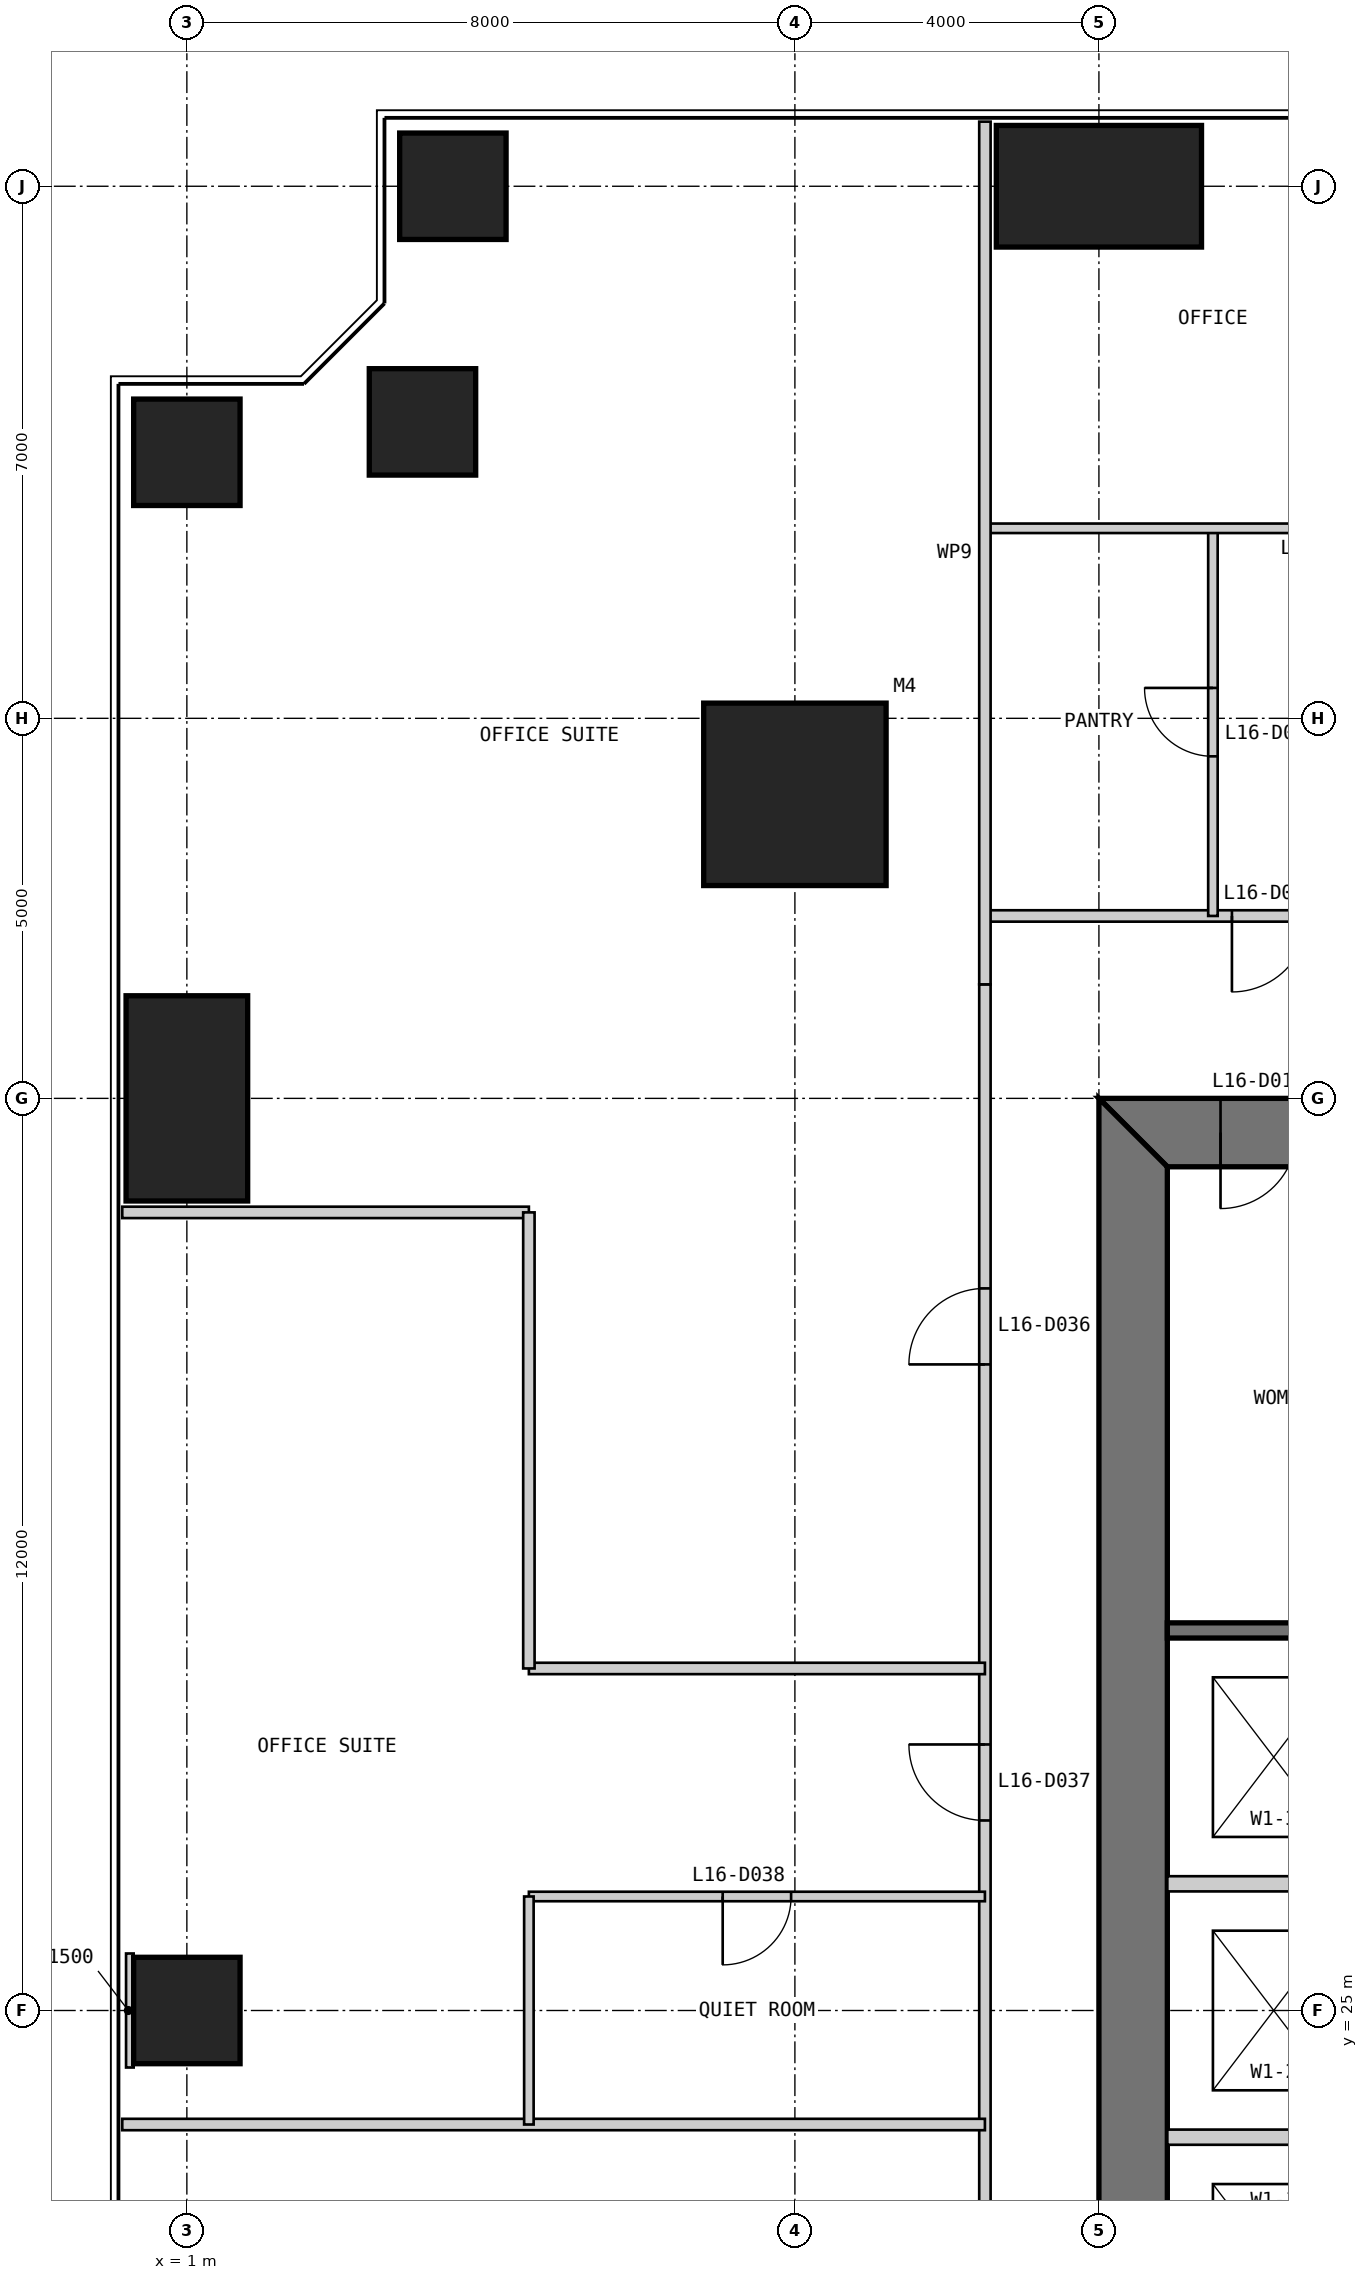
"""IFC4 building model, lengths in metres.
Left out: names, types, materials, properties, quantities, classifications, styles, units other than length and angle.
Written with IfcOpenShell. Run it as: python <this file> out.ifc"""

import sys

from ifc_helpers import new_model, si_unit, direction, frame, frame_2d, origin, origin_2d, place, context, subcontext, project, spatial, polyline, rectangle, outline, extrude, element, fill, save


model = new_model("IFC4")
c1 = context("Model", 3, precision=1e-05, world=origin(), true_north=direction((0.0, 1.0)))
c2 = subcontext(c1, "Body", "Model", "MODEL_VIEW")
j1 = project(units=[si_unit("LENGTHUNIT", "METRE"), si_unit("PLANEANGLEUNIT", "RADIAN")], contexts=[c1])
p1 = place(None, origin())
s1 = spatial("IfcSite", under=j1, at=p1, CompositionType="ELEMENT")
p2 = place(p1, origin())
s2 = spatial("IfcBuilding", under=s1, at=p2, CompositionType="ELEMENT")
p3 = place(p2, frame((0.0, 0.0, 71.0)))
s3 = spatial("IfcBuildingStorey", under=s2, at=p3, CompositionType="ELEMENT", Elevation=71.0)
p4 = place(p3, frame((9.0, 41.0, 0.0), z_axis=(0.0, 0.0, 1.0), x_axis=(1.0, 0.0, 0.0)))
e1 = element("IfcColumn", 1, at=p4, inside=s3, PredefinedType="COLUMN", context=c2, shape_type="SweptSolid", body=[
    extrude(rectangle(XDim=2.4, YDim=2.4, at=origin_2d()), origin(), (0.0, 0.0, 1.0), 4.0),
])
p5 = place(p3, frame((13.0, 49.0, 0.0), z_axis=(0.0, 0.0, 1.0), x_axis=(1.0, 0.0, 0.0)))
e2 = element("IfcColumn", 2, at=p5, inside=s3, PredefinedType="COLUMN", context=c2, shape_type="SweptSolid", body=[
    extrude(rectangle(XDim=2.7, YDim=1.6, at=origin_2d()), origin(), (0.0, 0.0, 1.0), 4.0),
])
for number, where, z_axis, x_axis in (
    (3, (4.5, 49.0, 0.0), (0.0, 0.0, 1.0), (1.0, 0.0, 0.0)),
    (4, (4.1, 45.9, 0.0), (0.0, 0.0, 1.0), (1.0, 0.0, 0.0)),
    (5, (1.0, 45.5, 0.0), (0.0, 0.0, 1.0), (1.0, 0.0, 0.0)),
):
    element("IfcColumn", number, at=place(p3, frame(where, z_axis=z_axis, x_axis=x_axis)), inside=s3, PredefinedType="COLUMN", context=c2, shape_type="SweptSolid", body=[
        extrude(rectangle(XDim=1.4, YDim=1.4, at=origin_2d()), origin(), (0.0, 0.0, 1.0), 4.0),
    ])
p6 = place(p3, frame((1.0, 37.0, 0.0), z_axis=(0.0, 0.0, 1.0), x_axis=(1.0, 0.0, 0.0)))
e6 = element("IfcColumn", 6, at=p6, inside=s3, PredefinedType="COLUMN", context=c2, shape_type="SweptSolid", body=[
    extrude(rectangle(XDim=1.6, YDim=2.7, at=origin_2d()), origin(), (0.0, 0.0, 1.0), 4.0),
])
p7 = place(p3, frame((1.0, 25.0, 0.0), z_axis=(0.0, 0.0, 1.0), x_axis=(1.0, 0.0, 0.0)))
e7 = element("IfcColumn", 7, at=p7, inside=s3, PredefinedType="COLUMN", context=c2, shape_type="SweptSolid", body=[
    extrude(rectangle(XDim=1.4, YDim=1.4, at=origin_2d()), origin(), (0.0, 0.0, 1.0), 4.0),
])
p8 = place(p3, frame((37.0, 36.55, 0.0), z_axis=(0.0, 0.0, 1.0), x_axis=(-1.0, 0.0, 0.0)))
e8 = element("IfcWall", 8, at=p8, inside=s3, PredefinedType="SHEAR", context=c2, shape_type="SweptSolid", body=[
    extrude(outline(polyline([(0.0, -0.45), (24.0, -0.45), (23.1, 0.45), (0.9, 0.45), (0.0, -0.45)])), origin(), (0.0, 0.0, 1.0), 4.0),
])
p9 = place(p8, frame((4.9, 0.0, 0.0)))
e9 = element("IfcOpeningElement", 9, at=p9, cuts=e8, PredefinedType="OPENING", context=c2, shape_type="SweptSolid", body=[
    extrude(rectangle(XDim=1.0, YDim=2.2, at=frame_2d((0.5, 1.1))), frame((0.0, 0.46, 0.0), z_axis=(0.0, -1.0, 0.0), x_axis=(1.0, 0.0, 0.0)), (0.0, 0.0, 1.0), 0.92),
])
p10 = place(p8, frame((8.9, 0.0, 0.0)))
e10 = element("IfcOpeningElement", 10, at=p10, cuts=e8, PredefinedType="OPENING", context=c2, shape_type="SweptSolid", body=[
    extrude(rectangle(XDim=1.1, YDim=2.2, at=frame_2d((0.55, 1.1))), frame((0.0, 0.46, 0.0), z_axis=(0.0, -1.0, 0.0), x_axis=(1.0, 0.0, 0.0)), (0.0, 0.0, 1.0), 0.92),
])
p11 = place(p8, frame((15.05, 0.0, 0.0)))
e11 = element("IfcOpeningElement", 11, at=p11, cuts=e8, PredefinedType="OPENING", context=c2, shape_type="SweptSolid", body=[
    extrude(rectangle(XDim=0.9, YDim=2.2, at=frame_2d((0.45, 1.1))), frame((0.0, 0.46, 0.0), z_axis=(0.0, -1.0, 0.0), x_axis=(1.0, 0.0, 0.0)), (0.0, 0.0, 1.0), 0.92),
])
p12 = place(p8, frame((17.9, 0.0, 0.0)))
e12 = element("IfcOpeningElement", 12, at=p12, cuts=e8, PredefinedType="OPENING", context=c2, shape_type="SweptSolid", body=[
    extrude(rectangle(XDim=1.0, YDim=2.2, at=frame_2d((0.5, 1.1))), frame((0.0, 0.46, 0.0), z_axis=(0.0, -1.0, 0.0), x_axis=(1.0, 0.0, 0.0)), (0.0, 0.0, 1.0), 0.92),
])
p13 = place(p8, frame((21.4, 0.0, 0.0)))
e13 = element("IfcOpeningElement", 13, at=p13, cuts=e8, PredefinedType="OPENING", context=c2, shape_type="SweptSolid", body=[
    extrude(rectangle(XDim=1.0, YDim=2.2, at=frame_2d((0.5, 1.1))), frame((0.0, 0.46, 0.0), z_axis=(0.0, -1.0, 0.0), x_axis=(1.0, 0.0, 0.0)), (0.0, 0.0, 1.0), 0.92),
])
p14 = place(p3, frame((13.45, 36.1, 0.0), z_axis=(0.0, 0.0, 1.0), x_axis=(0.0, -1.0, 0.0)))
e14 = element("IfcWall", 14, at=p14, inside=s3, PredefinedType="SHEAR", context=c2, shape_type="SweptSolid", body=[
    extrude(outline(polyline([(-0.9, -0.45), (23.1, -0.45), (22.2, 0.45), (0.0, 0.45), (-0.9, -0.45)])), origin(), (0.0, 0.0, 1.0), 4.0),
])
p15 = place(p14, frame((20.2, 0.0, 0.0)))
e15 = element("IfcOpeningElement", 15, at=p15, cuts=e14, PredefinedType="OPENING", context=c2, shape_type="SweptSolid", body=[
    extrude(rectangle(XDim=1.0, YDim=2.2, at=frame_2d((0.5, 1.1))), frame((0.0, 0.46, 0.0), z_axis=(0.0, -1.0, 0.0), x_axis=(1.0, 0.0, 0.0)), (0.0, 0.0, 1.0), 0.92),
])
p16 = place(p14, frame((17.25, 0.0, 0.0)))
e16 = element("IfcOpeningElement", 16, at=p16, cuts=e14, PredefinedType="OPENING", context=c2, shape_type="SweptSolid", body=[
    extrude(rectangle(XDim=0.9, YDim=2.2, at=frame_2d((0.45, 1.1))), frame((0.0, 0.46, 0.0), z_axis=(0.0, -1.0, 0.0), x_axis=(1.0, 0.0, 0.0)), (0.0, 0.0, 1.0), 0.92),
])
for number, where, z_axis, x_axis in (
    (17, (13.9, 23.333, 0.0), (0.0, 0.0, 1.0), (1.0, 0.0, 0.0)),
    (18, (13.9, 26.667, 0.0), (0.0, 0.0, 1.0), (1.0, 0.0, 0.0)),
):
    element("IfcWall", number, at=place(p3, frame(where, z_axis=z_axis, x_axis=x_axis)), inside=s3, PredefinedType="PARTITIONING", context=c2, shape_type="SweptSolid", body=[
        extrude(rectangle(XDim=2.8, YDim=0.2, at=frame_2d((1.4, 0.0))), origin(), (0.0, 0.0, 1.0), 3.8),
    ])
p17 = place(p3, frame((29.7, 30.0, 0.0), z_axis=(0.0, 0.0, 1.0), x_axis=(-1.0, 0.0, 0.0)))
e19 = element("IfcWall", 19, at=p17, inside=s3, PredefinedType="SOLIDWALL", context=c2, shape_type="SweptSolid", body=[
    extrude(rectangle(XDim=15.8, YDim=0.2, at=frame_2d((7.9, 0.0))), origin(), (0.0, 0.0, 1.0), 3.8),
])
p18 = place(p3, frame((39.4, 39.4, 0.0), z_axis=(0.0, 0.0, 1.0), x_axis=(-1.0, 0.0, 0.0)))
e20 = element("IfcWall", 20, at=p18, inside=s3, PredefinedType="PARTITIONING", context=c2, shape_type="SweptSolid", body=[
    extrude(rectangle(XDim=27.9, YDim=0.15, at=frame_2d((13.95, 0.0))), origin(), (0.0, 0.0, 1.0), 3.85),
])
p19 = place(p18, frame((1.15, 0.0, 0.0)))
e21 = element("IfcOpeningElement", 21, at=p19, cuts=e20, PredefinedType="OPENING", context=c2, shape_type="SweptSolid", body=[
    extrude(rectangle(XDim=1.0, YDim=2.2, at=frame_2d((0.5, 1.1))), frame((0.0, 0.085, 0.0), z_axis=(0.0, -1.0, 0.0), x_axis=(1.0, 0.0, 0.0)), (0.0, 0.0, 1.0), 0.17),
])
p20 = place(p18, frame((23.65, 0.0, 0.0)))
e22 = element("IfcOpeningElement", 22, at=p20, cuts=e20, PredefinedType="OPENING", context=c2, shape_type="SweptSolid", body=[
    extrude(rectangle(XDim=1.0, YDim=2.2, at=frame_2d((0.5, 1.1))), frame((0.0, 0.085, 0.0), z_axis=(0.0, -1.0, 0.0), x_axis=(1.0, 0.0, 0.0)), (0.0, 0.0, 1.0), 0.17),
])
p21 = place(p3, frame((14.5, 44.5, 0.0), z_axis=(0.0, 0.0, 1.0), x_axis=(0.0, -1.0, 0.0)))
e23 = element("IfcWall", 23, at=p21, inside=s3, PredefinedType="PARTITIONING", context=c2, shape_type="SweptSolid", body=[
    extrude(rectangle(XDim=5.1, YDim=0.125, at=frame_2d((2.55, 0.0))), origin(), (0.0, 0.0, 1.0), 3.85),
])
p22 = place(p21, frame((2.1, 0.0, 0.0)))
e24 = element("IfcOpeningElement", 24, at=p22, cuts=e23, PredefinedType="OPENING", context=c2, shape_type="SweptSolid", body=[
    extrude(rectangle(XDim=0.9, YDim=2.2, at=frame_2d((0.45, 1.1))), frame((0.0, 0.073, 0.0), z_axis=(0.0, -1.0, 0.0), x_axis=(1.0, 0.0, 0.0)), (0.0, 0.0, 1.0), 0.145),
])
p23 = place(p3, frame((29.5, 44.5, 0.0), z_axis=(0.0, 0.0, 1.0), x_axis=(-1.0, 0.0, 0.0)))
e25 = element("IfcWall", 25, at=p23, inside=s3, PredefinedType="PARTITIONING", context=c2, shape_type="SweptSolid", body=[
    extrude(rectangle(XDim=18.0, YDim=0.125, at=frame_2d((9.0, 0.0))), origin(), (0.0, 0.0, 1.0), 3.85),
])
p24 = place(p23, frame((10.0, 0.0, 0.0)))
e26 = element("IfcOpeningElement", 26, at=p24, cuts=e25, PredefinedType="OPENING", context=c2, shape_type="SweptSolid", body=[
    extrude(rectangle(XDim=1.0, YDim=2.2, at=frame_2d((0.5, 1.1))), frame((0.0, 0.073, 0.0), z_axis=(0.0, -1.0, 0.0), x_axis=(1.0, 0.0, 0.0)), (0.0, 0.0, 1.0), 0.145),
])
p25 = place(p23, frame((13.05, 0.0, 0.0)))
e27 = element("IfcOpeningElement", 27, at=p25, cuts=e25, PredefinedType="OPENING", context=c2, shape_type="SweptSolid", body=[
    extrude(rectangle(XDim=0.9, YDim=2.2, at=frame_2d((0.45, 1.1))), frame((0.0, 0.073, 0.0), z_axis=(0.0, -1.0, 0.0), x_axis=(1.0, 0.0, 0.0)), (0.0, 0.0, 1.0), 0.145),
])
p26 = place(p3, frame((11.5, 38.5, 0.0), z_axis=(0.0, 0.0, 1.0), x_axis=(0.0, -1.0, 0.0)))
e28 = element("IfcWall", 28, at=p26, inside=s3, PredefinedType="PARTITIONING", context=c2, shape_type="SweptSolid", body=[
    extrude(rectangle(XDim=27.0, YDim=0.15, at=frame_2d((13.5, 0.0))), origin(), (0.0, 0.0, 1.0), 3.85),
])
p27 = place(p26, frame((4.0, 0.0, 0.0)))
e29 = element("IfcOpeningElement", 29, at=p27, cuts=e28, PredefinedType="OPENING", context=c2, shape_type="SweptSolid", body=[
    extrude(rectangle(XDim=1.0, YDim=2.2, at=frame_2d((0.5, 1.1))), frame((0.0, 0.085, 0.0), z_axis=(0.0, -1.0, 0.0), x_axis=(1.0, 0.0, 0.0)), (0.0, 0.0, 1.0), 0.17),
])
p28 = place(p26, frame((10.0, 0.0, 0.0)))
e30 = element("IfcOpeningElement", 30, at=p28, cuts=e28, PredefinedType="OPENING", context=c2, shape_type="SweptSolid", body=[
    extrude(rectangle(XDim=1.0, YDim=2.2, at=frame_2d((0.5, 1.1))), frame((0.0, 0.085, 0.0), z_axis=(0.0, -1.0, 0.0), x_axis=(1.0, 0.0, 0.0)), (0.0, 0.0, 1.0), 0.17),
])
p29 = place(p26, frame((17.5, 0.0, 0.0)))
e31 = element("IfcOpeningElement", 31, at=p29, cuts=e28, PredefinedType="OPENING", context=c2, shape_type="SweptSolid", body=[
    extrude(rectangle(XDim=1.0, YDim=2.2, at=frame_2d((0.5, 1.1))), frame((0.0, 0.085, 0.0), z_axis=(0.0, -1.0, 0.0), x_axis=(1.0, 0.0, 0.0)), (0.0, 0.0, 1.0), 0.17),
])
p30 = place(p26, frame((23.5, 0.0, 0.0)))
e32 = element("IfcOpeningElement", 32, at=p30, cuts=e28, PredefinedType="OPENING", context=c2, shape_type="SweptSolid", body=[
    extrude(rectangle(XDim=1.0, YDim=2.2, at=frame_2d((0.5, 1.1))), frame((0.0, 0.085, 0.0), z_axis=(0.0, -1.0, 0.0), x_axis=(1.0, 0.0, 0.0)), (0.0, 0.0, 1.0), 0.17),
])
p31 = place(p3, frame((11.5, 49.85, 0.0), z_axis=(0.0, 0.0, 1.0), x_axis=(0.0, -1.0, 0.0)))
e33 = element("IfcWall", 33, at=p31, inside=s3, PredefinedType="PARTITIONING", context=c2, shape_type="SweptSolid", body=[
    extrude(rectangle(XDim=11.35, YDim=0.15, at=frame_2d((5.675, 0.0))), origin(), (0.0, 0.0, 1.0), 3.85),
])
p32 = place(p3, frame((0.15, 35.5, 0.0), z_axis=(0.0, 0.0, 1.0), x_axis=(1.0, 0.0, 0.0)))
e34 = element("IfcWall", 34, at=p32, inside=s3, PredefinedType="PARTITIONING", context=c2, shape_type="SweptSolid", body=[
    extrude(rectangle(XDim=5.35, YDim=0.15, at=frame_2d((2.675, 0.0))), origin(), (0.0, 0.0, 1.0), 3.85),
])
p33 = place(p3, frame((5.5, 29.5, 0.0), z_axis=(0.0, 0.0, 1.0), x_axis=(1.0, 0.0, 0.0)))
e35 = element("IfcWall", 35, at=p33, inside=s3, PredefinedType="PARTITIONING", context=c2, shape_type="SweptSolid", body=[
    extrude(rectangle(XDim=6.0, YDim=0.15, at=frame_2d((3.0, 0.0))), origin(), (0.0, 0.0, 1.0), 3.85),
])
p34 = place(p3, frame((5.5, 26.5, 0.0), z_axis=(0.0, 0.0, 1.0), x_axis=(1.0, 0.0, 0.0)))
e36 = element("IfcWall", 36, at=p34, inside=s3, PredefinedType="PARTITIONING", context=c2, shape_type="SweptSolid", body=[
    extrude(rectangle(XDim=6.0, YDim=0.125, at=frame_2d((3.0, 0.0))), origin(), (0.0, 0.0, 1.0), 3.85),
])
p35 = place(p34, frame((2.55, 0.0, 0.0)))
e37 = element("IfcOpeningElement", 37, at=p35, cuts=e36, PredefinedType="OPENING", context=c2, shape_type="SweptSolid", body=[
    extrude(rectangle(XDim=0.9, YDim=2.2, at=frame_2d((0.45, 1.1))), frame((0.0, 0.073, 0.0), z_axis=(0.0, -1.0, 0.0), x_axis=(1.0, 0.0, 0.0)), (0.0, 0.0, 1.0), 0.145),
])
p36 = place(p3, frame((0.15, 23.5, 0.0), z_axis=(0.0, 0.0, 1.0), x_axis=(1.0, 0.0, 0.0)))
e38 = element("IfcWall", 38, at=p36, inside=s3, PredefinedType="PARTITIONING", context=c2, shape_type="SweptSolid", body=[
    extrude(rectangle(XDim=11.35, YDim=0.15, at=frame_2d((5.675, 0.0))), origin(), (0.0, 0.0, 1.0), 3.85),
])
p37 = place(p3, frame((5.5, 35.5, 0.0), z_axis=(0.0, 0.0, 1.0), x_axis=(0.0, -1.0, 0.0)))
e39 = element("IfcWall", 39, at=p37, inside=s3, PredefinedType="PARTITIONING", context=c2, shape_type="SweptSolid", body=[
    extrude(rectangle(XDim=6.0, YDim=0.15, at=frame_2d((3.0, 0.0))), origin(), (0.0, 0.0, 1.0), 3.85),
])
p38 = place(p3, frame((5.5, 26.5, 0.0), z_axis=(0.0, 0.0, 1.0), x_axis=(0.0, -1.0, 0.0)))
e40 = element("IfcWall", 40, at=p38, inside=s3, PredefinedType="PARTITIONING", context=c2, shape_type="SweptSolid", body=[
    extrude(rectangle(XDim=3.0, YDim=0.125, at=frame_2d((1.5, 0.0))), origin(), (0.0, 0.0, 1.0), 3.85),
])
p39 = place(p3, frame((0.2, 25.0, 0.0), z_axis=(0.0, 0.0, 1.0), x_axis=(1.0, 0.0, 0.0)))
e41 = element("IfcWall", 41, at=p39, inside=s3, PredefinedType="PARTITIONING", context=c2, shape_type="SweptSolid", body=[
    extrude(rectangle(XDim=0.1, YDim=1.5, at=frame_2d((0.05, 0.0))), origin(), (0.0, 0.0, 1.0), 3.85),
])
p40 = place(p13, origin())
e42 = element("IfcDoor", 42, at=p40, inside=s3, OperationType="SINGLE_SWING_RIGHT", PredefinedType="DOOR", context=c2, shape_type="SweptSolid", body=[
    extrude(rectangle(XDim=1.0, YDim=2.2, at=frame_2d((0.5, 1.1))), frame((0.0, 0.025, 0.0), z_axis=(0.0, -1.0, 0.0), x_axis=(1.0, 0.0, 0.0)), (0.0, 0.0, 1.0), 0.05),
    extrude(outline(polyline([(0.0, 0.0), (0.04, 0.0), (0.04, 2.16), (0.96, 2.16), (0.96, 0.0), (1.0, 0.0), (1.0, 2.2), (0.0, 2.2), (0.0, 0.0)])), frame((0.0, 0.3, 0.0), z_axis=(0.0, -1.0, 0.0), x_axis=(1.0, 0.0, 0.0)), (0.0, 0.0, 1.0), 0.6),
])
fill(e13, e42)
p41 = place(p20, origin())
e43 = element("IfcDoor", 43, at=p41, inside=s3, OperationType="SINGLE_SWING_RIGHT", PredefinedType="DOOR", context=c2, shape_type="SweptSolid", body=[
    extrude(rectangle(XDim=1.0, YDim=2.2, at=frame_2d((0.5, 1.1))), frame((0.0, 0.025, 0.0), z_axis=(0.0, -1.0, 0.0), x_axis=(1.0, 0.0, 0.0)), (0.0, 0.0, 1.0), 0.05),
])
fill(e22, e43)
p42 = place(p22, frame((0.9, 0.0, 0.0), z_axis=(0.0, 0.0, 1.0), x_axis=(-1.0, 0.0, 0.0)))
e44 = element("IfcDoor", 44, at=p42, inside=s3, OperationType="SINGLE_SWING_RIGHT", PredefinedType="DOOR", context=c2, shape_type="SweptSolid", body=[
    extrude(rectangle(XDim=0.9, YDim=2.2, at=frame_2d((0.45, 1.1))), frame((0.0, 0.025, 0.0), z_axis=(0.0, -1.0, 0.0), x_axis=(1.0, 0.0, 0.0)), (0.0, 0.0, 1.0), 0.05),
])
fill(e24, e44)
p43 = place(p27, frame((1.0, 0.0, 0.0), z_axis=(0.0, 0.0, 1.0), x_axis=(-1.0, 0.0, 0.0)))
e45 = element("IfcDoor", 45, at=p43, inside=s3, OperationType="SINGLE_SWING_LEFT", PredefinedType="DOOR", context=c2, shape_type="SweptSolid", body=[
    extrude(rectangle(XDim=1.0, YDim=2.2, at=frame_2d((0.5, 1.1))), frame((0.0, 0.025, 0.0), z_axis=(0.0, -1.0, 0.0), x_axis=(1.0, 0.0, 0.0)), (0.0, 0.0, 1.0), 0.05),
])
fill(e29, e45)
p44 = place(p28, frame((1.0, 0.0, 0.0), z_axis=(0.0, 0.0, 1.0), x_axis=(-1.0, 0.0, 0.0)))
e46 = element("IfcDoor", 46, at=p44, inside=s3, OperationType="SINGLE_SWING_RIGHT", PredefinedType="DOOR", context=c2, shape_type="SweptSolid", body=[
    extrude(rectangle(XDim=1.0, YDim=2.2, at=frame_2d((0.5, 1.1))), frame((0.0, 0.025, 0.0), z_axis=(0.0, -1.0, 0.0), x_axis=(1.0, 0.0, 0.0)), (0.0, 0.0, 1.0), 0.05),
])
fill(e30, e46)
p45 = place(p35, frame((0.9, 0.0, 0.0), z_axis=(0.0, 0.0, 1.0), x_axis=(-1.0, 0.0, 0.0)))
e47 = element("IfcDoor", 47, at=p45, inside=s3, OperationType="SINGLE_SWING_RIGHT", PredefinedType="DOOR", context=c2, shape_type="SweptSolid", body=[
    extrude(rectangle(XDim=0.9, YDim=2.2, at=frame_2d((0.45, 1.1))), frame((0.0, 0.025, 0.0), z_axis=(0.0, -1.0, 0.0), x_axis=(1.0, 0.0, 0.0)), (0.0, 0.0, 1.0), 0.05),
])
fill(e37, e47)
save(model, sys.argv[1])
